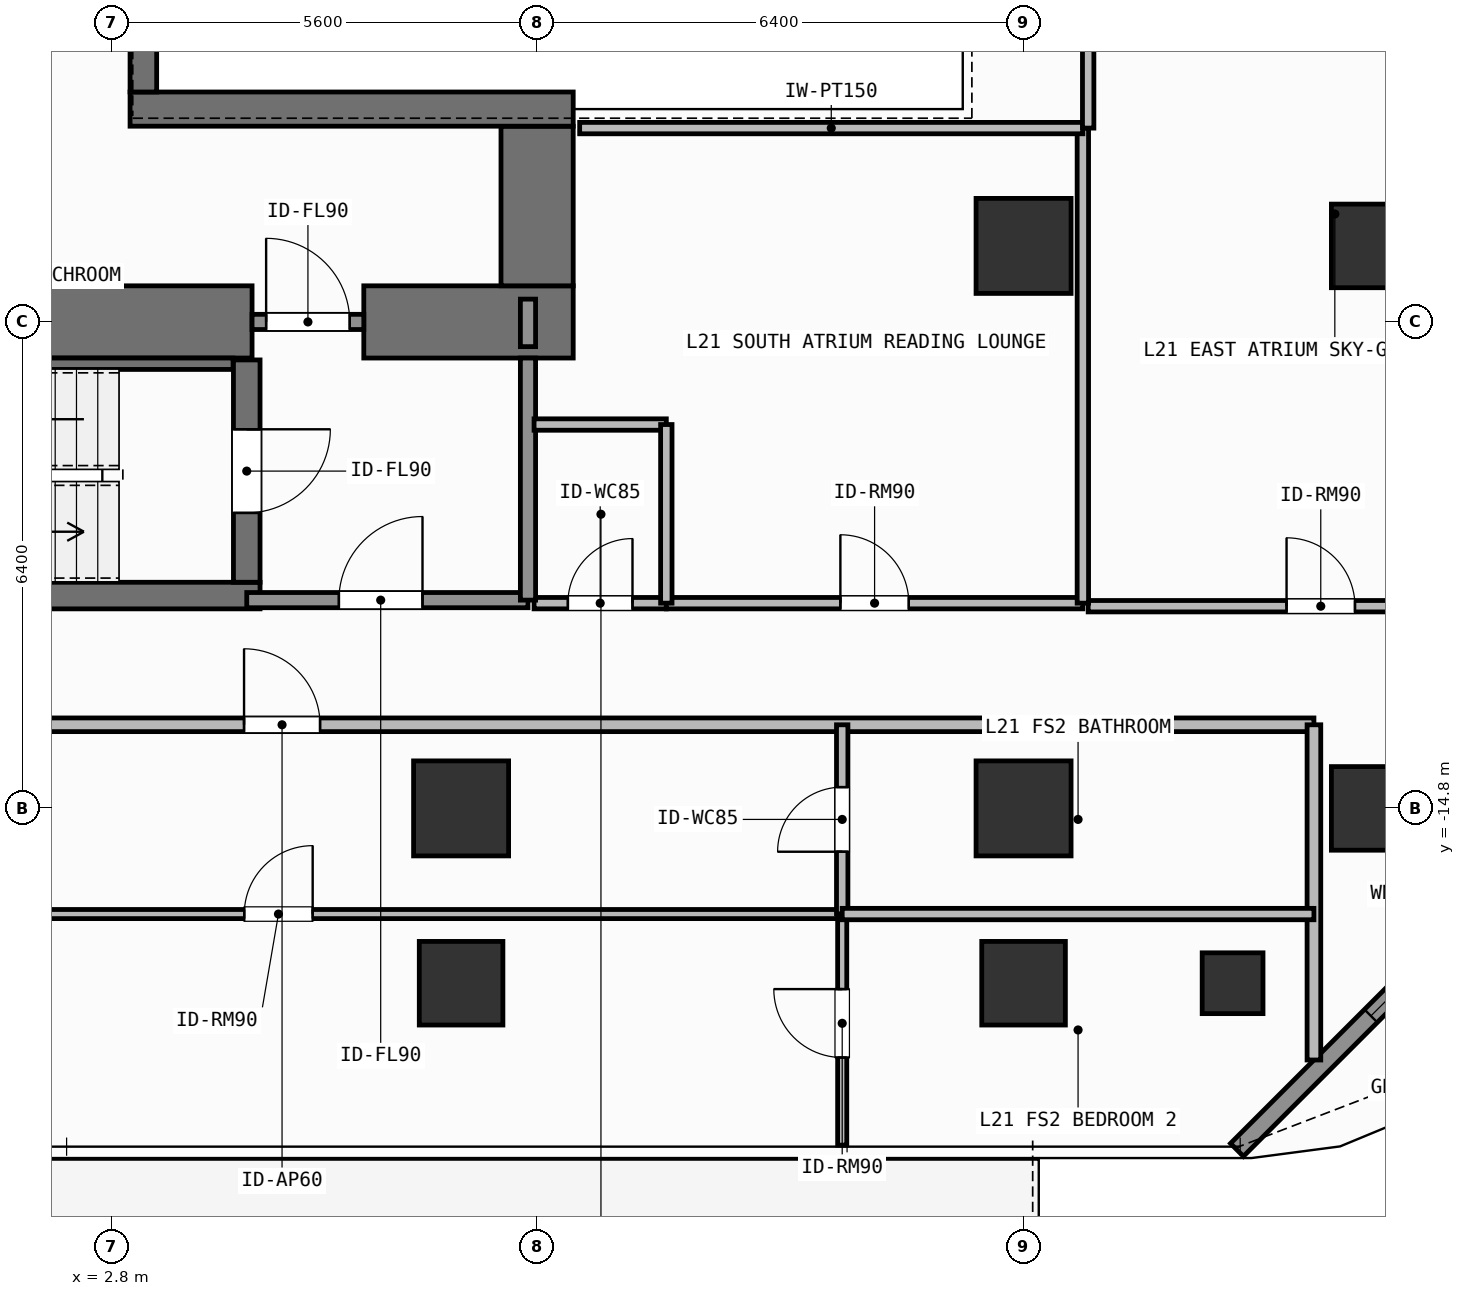
"""IFC4 building model, lengths in metres.
Left out: names, types, materials, properties, quantities, classifications, styles, units other than length and angle.
Written with IfcOpenShell. Run it as: python <this file> out.ifc"""

import sys

from ifc_helpers import new_model, si_unit, direction, frame, frame_2d, origin, origin_2d, place, context, subcontext, project, spatial, rectangle, hollow_rectangle, extrude, element, fill, save


model = new_model("IFC4")
c1 = context("Model", 3, precision=1e-05, world=origin(), true_north=direction((0.0, 1.0)))
c2 = subcontext(c1, "Body", "Model", "MODEL_VIEW")
j1 = project(units=[si_unit("LENGTHUNIT", "METRE"), si_unit("PLANEANGLEUNIT", "RADIAN")], contexts=[c1])
p1 = place(None, origin())
s1 = spatial("IfcSite", under=j1, at=p1, CompositionType="ELEMENT")
p2 = place(p1, origin())
s2 = spatial("IfcBuilding", under=s1, at=p2, CompositionType="ELEMENT")
p3 = place(p2, frame((0.0, 0.0, 85.2)))
s3 = spatial("IfcBuildingStorey", under=s2, at=p3, CompositionType="ELEMENT", Elevation=85.2)
p4 = place(p3, frame((-2.62, -8.4, 0.0), z_axis=(0.0, 0.0, 1.0), x_axis=(1.0, 0.0, 0.0)))
e1 = element("IfcWall", 1, at=p4, inside=s3, PredefinedType="SHEAR", context=c2, shape_type="SweptSolid", body=[
    extrude(rectangle(XDim=7.27, YDim=0.95, at=frame_2d((3.635, 0.0))), origin(), (0.0, 0.0, 1.0), 3.9),
])
p5 = place(p3, frame((6.12, -8.4, 0.0), z_axis=(0.0, 0.0, 1.0), x_axis=(1.0, 0.0, 0.0)))
e2 = element("IfcWall", 2, at=p5, inside=s3, PredefinedType="SHEAR", context=c2, shape_type="SweptSolid", body=[
    extrude(rectangle(XDim=2.755, YDim=0.95, at=frame_2d((1.377, 0.0))), origin(), (0.0, 0.0, 1.0), 3.9),
])
p6 = place(p3, frame((8.4, -7.925, 0.0), z_axis=(0.0, 0.0, 1.0), x_axis=(0.0, 1.0, 0.0)))
e3 = element("IfcWall", 3, at=p6, inside=s3, PredefinedType="SHEAR", context=c2, shape_type="SweptSolid", body=[
    extrude(rectangle(XDim=2.1, YDim=0.95, at=frame_2d((1.05, 0.0))), origin(), (0.0, 0.0, 1.0), 3.9),
])
p7 = place(p3, frame((3.045, -5.6, 0.0), z_axis=(0.0, 0.0, 1.0), x_axis=(1.0, 0.0, 0.0)))
e4 = element("IfcWall", 4, at=p7, inside=s3, PredefinedType="SHEAR", context=c2, shape_type="SweptSolid", body=[
    extrude(rectangle(XDim=5.83, YDim=0.45, at=frame_2d((2.915, 0.0))), origin(), (0.0, 0.0, 1.0), 3.9),
])
p8 = place(p3, frame((3.22, -5.375, 0.0), z_axis=(0.0, 0.0, 1.0), x_axis=(0.0, 1.0, 0.0)))
e5 = element("IfcWall", 5, at=p8, inside=s3, PredefinedType="SHEAR", context=c2, shape_type="SweptSolid", body=[
    extrude(rectangle(XDim=10.75, YDim=0.35, at=frame_2d((5.375, 0.0))), origin(), (0.0, 0.0, 1.0), 3.9),
])
p9 = place(p3, frame((-2.555, -12.0, 0.0), z_axis=(0.0, 0.0, 1.0), x_axis=(1.0, 0.0, 0.0)))
e6 = element("IfcWall", 6, at=p9, inside=s3, PredefinedType="SHEAR", context=c2, shape_type="SweptSolid", body=[
    extrude(rectangle(XDim=7.31, YDim=0.35, at=frame_2d((3.655, 0.0))), origin(), (0.0, 0.0, 1.0), 3.9),
])
p10 = place(p3, frame((-2.2, -8.95, 0.0), z_axis=(0.0, 0.0, 1.0), x_axis=(1.0, 0.0, 0.0)))
e7 = element("IfcWall", 7, at=p10, inside=s3, PredefinedType="SHEAR", context=c2, shape_type="SweptSolid", body=[
    extrude(rectangle(XDim=6.6, YDim=0.15, at=frame_2d((3.3, 0.0))), origin(), (0.0, 0.0, 1.0), 3.9),
])
p11 = place(p3, frame((4.58, -8.9, 0.0), z_axis=(0.0, 0.0, 1.0), x_axis=(0.0, -1.0, 0.0)))
e8 = element("IfcWall", 8, at=p11, inside=s3, PredefinedType="SHEAR", context=c2, shape_type="SweptSolid", body=[
    extrude(rectangle(XDim=2.925, YDim=0.35, at=frame_2d((1.462, 0.0))), origin(), (0.0, 0.0, 1.0), 3.9),
])
p12 = place(p11, frame((0.913, 0.0, 0.0)))
e9 = element("IfcOpeningElement", 9, at=p12, cuts=e8, PredefinedType="OPENING", context=c2, shape_type="SweptSolid", body=[
    extrude(rectangle(XDim=1.1, YDim=2.15, at=frame_2d((0.55, 1.075))), frame((0.0, 0.185, 0.0), z_axis=(0.0, -1.0, 0.0), x_axis=(1.0, 0.0, 0.0)), (0.0, 0.0, 1.0), 0.37),
])
for number, where, z_axis, x_axis in (
    (10, (7.4, -14.8, 0.0), (0.0, 0.0, 1.0), (1.0, 0.0, 0.0)),
    (11, (14.8, -14.8, 0.0), (0.0, 0.0, 1.0), (1.0, 0.0, 0.0)),
    (12, (14.8, -7.4, 0.0), (0.0, 0.0, 1.0), (1.0, 0.0, 0.0)),
):
    element("IfcColumn", number, at=place(p3, frame(where, z_axis=z_axis, x_axis=x_axis)), inside=s3, PredefinedType="COLUMN", context=c2, shape_type="SweptSolid", body=[
        extrude(rectangle(XDim=1.25, YDim=1.25, at=origin_2d()), origin(), (0.0, 0.0, 1.0), 3.9),
    ])
for number, where, z_axis, x_axis in (
    (13, (19.4, -14.8, 0.0), (0.0, 0.0, 1.0), (1.0, 0.0, 0.0)),
    (14, (19.4, -7.4, 0.0), (0.0, 0.0, 1.0), (1.0, 0.0, 0.0)),
    (15, (7.4, -17.1, 0.0), (0.0, 0.0, 1.0), (1.0, 0.0, 0.0)),
    (16, (14.8, -17.1, 0.0), (0.0, 0.0, 1.0), (1.0, 0.0, 0.0)),
):
    element("IfcColumn", number, at=place(p3, frame(where, z_axis=z_axis, x_axis=x_axis)), inside=s3, PredefinedType="COLUMN", context=c2, shape_type="SweptSolid", body=[
        extrude(rectangle(XDim=1.1, YDim=1.1, at=origin_2d()), origin(), (0.0, 0.0, 1.0), 3.9),
    ])
p13 = place(p3, frame((17.55, -17.1, 0.0), z_axis=(0.0, 0.0, 1.0), x_axis=(1.0, 0.0, 0.0)))
e17 = element("IfcColumn", 17, at=p13, inside=s3, PredefinedType="COLUMN", context=c2, shape_type="SweptSolid", body=[
    extrude(hollow_rectangle(XDim=0.8, YDim=0.8, WallThickness=0.036, at=origin_2d()), origin(), (0.0, 0.0, 1.0), 3.9),
])
p14 = place(p3, frame((22.192, -14.708, 0.0), z_axis=(0.0, 0.0, 1.0), x_axis=(-0.707087954376, -0.707125607496, 0.0)))
e18 = element("IfcWall", 18, at=p14, inside=s3, PredefinedType="SOLIDWALL", context=c2, shape_type="SweptSolid", body=[
    extrude(rectangle(XDim=6.484, YDim=0.24, at=frame_2d((3.242, 0.0))), origin(), (0.0, 0.0, 1.0), 3.68),
])
p15 = place(p14, frame((2.492, 0.0, 0.8)))
e19 = element("IfcOpeningElement", 19, at=p15, cuts=e18, PredefinedType="OPENING", context=c2, shape_type="SweptSolid", body=[
    extrude(rectangle(XDim=1.5, YDim=1.85, at=frame_2d((0.75, 0.925))), frame((0.0, 0.13, 0.0), z_axis=(0.0, -1.0, 0.0), x_axis=(1.0, 0.0, 0.0)), (0.0, 0.0, 1.0), 0.26),
])
p16 = place(p3, frame((4.58, -12.06, 0.0), z_axis=(0.0, 0.0, 1.0), x_axis=(1.0, 0.0, 0.0)))
e20 = element("IfcWall", 20, at=p16, inside=s3, PredefinedType="SOLIDWALL", context=c2, shape_type="SweptSolid", body=[
    extrude(rectangle(XDim=3.7, YDim=0.2, at=frame_2d((1.85, 0.0))), origin(), (0.0, 0.0, 1.0), 3.68),
])
p17 = place(p16, frame((1.212, 0.0, 0.0)))
e21 = element("IfcOpeningElement", 21, at=p17, cuts=e20, PredefinedType="OPENING", context=c2, shape_type="SweptSolid", body=[
    extrude(rectangle(XDim=1.1, YDim=2.15, at=frame_2d((0.55, 1.075))), frame((0.0, 0.11, 0.0), z_axis=(0.0, -1.0, 0.0), x_axis=(1.0, 0.0, 0.0)), (0.0, 0.0, 1.0), 0.22),
])
p18 = place(p3, frame((4.65, -8.4, 0.0), z_axis=(0.0, 0.0, 1.0), x_axis=(1.0, 0.0, 0.0)))
e22 = element("IfcWall", 22, at=p18, inside=s3, PredefinedType="SOLIDWALL", context=c2, shape_type="SweptSolid", body=[
    extrude(rectangle(XDim=1.47, YDim=0.2, at=frame_2d((0.735, 0.0))), origin(), (0.0, 0.0, 1.0), 2.72),
])
p19 = place(p18, frame((0.185, 0.0, 0.0)))
e23 = element("IfcOpeningElement", 23, at=p19, cuts=e22, PredefinedType="OPENING", context=c2, shape_type="SweptSolid", body=[
    extrude(rectangle(XDim=1.1, YDim=2.15, at=frame_2d((0.55, 1.075))), frame((0.0, 0.11, 0.0), z_axis=(0.0, -1.0, 0.0), x_axis=(1.0, 0.0, 0.0)), (0.0, 0.0, 1.0), 0.22),
])
p20 = place(p3, frame((8.36, -12.1, 0.0), z_axis=(0.0, 0.0, 1.0), x_axis=(1.0, 0.0, 0.0)))
e24 = element("IfcWall", 24, at=p20, inside=s3, PredefinedType="PARTITIONING", context=c2, shape_type="SweptSolid", body=[
    extrude(rectangle(XDim=1.74, YDim=0.15, at=frame_2d((0.87, 0.0))), origin(), (0.0, 0.0, 1.0), 3.68),
])
p21 = place(p20, frame((0.445, 0.0, 0.0)))
e25 = element("IfcOpeningElement", 25, at=p21, cuts=e24, PredefinedType="OPENING", context=c2, shape_type="SweptSolid", body=[
    extrude(rectangle(XDim=0.85, YDim=2.1, at=frame_2d((0.425, 1.05))), frame((0.0, 0.085, 0.0), z_axis=(0.0, -1.0, 0.0), x_axis=(1.0, 0.0, 0.0)), (0.0, 0.0, 1.0), 0.17),
])
p22 = place(p3, frame((10.1, -12.1, 0.0), z_axis=(0.0, 0.0, 1.0), x_axis=(1.0, 0.0, 0.0)))
e26 = element("IfcWall", 26, at=p22, inside=s3, PredefinedType="PARTITIONING", context=c2, shape_type="SweptSolid", body=[
    extrude(rectangle(XDim=5.48, YDim=0.15, at=frame_2d((2.74, 0.0))), origin(), (0.0, 0.0, 1.0), 3.68),
])
p23 = place(p22, frame((2.29, 0.0, 0.0)))
e27 = element("IfcOpeningElement", 27, at=p23, cuts=e26, PredefinedType="OPENING", context=c2, shape_type="SweptSolid", body=[
    extrude(rectangle(XDim=0.9, YDim=2.1, at=frame_2d((0.45, 1.05))), frame((0.0, 0.085, 0.0), z_axis=(0.0, -1.0, 0.0), x_axis=(1.0, 0.0, 0.0)), (0.0, 0.0, 1.0), 0.17),
])
p24 = place(p3, frame((-7.634, -13.7, 0.0), z_axis=(0.0, 0.0, 1.0), x_axis=(1.0, 0.0, 0.0)))
e28 = element("IfcWall", 28, at=p24, inside=s3, PredefinedType="PARTITIONING", context=c2, shape_type="SweptSolid", body=[
    extrude(rectangle(XDim=26.254, YDim=0.18, at=frame_2d((13.127, 0.0))), origin(), (0.0, 0.0, 1.0), 3.68),
])
p25 = place(p24, frame((12.178, 0.0, 0.0)))
e29 = element("IfcOpeningElement", 29, at=p25, cuts=e28, PredefinedType="OPENING", context=c2, shape_type="SweptSolid", body=[
    extrude(rectangle(XDim=1.0, YDim=2.2, at=frame_2d((0.5, 1.1))), frame((0.0, 0.1, 0.0), z_axis=(0.0, -1.0, 0.0), x_axis=(1.0, 0.0, 0.0)), (0.0, 0.0, 1.0), 0.2),
])
p26 = place(p3, frame((-2.24, -16.19, 0.0), z_axis=(0.0, 0.0, 1.0), x_axis=(1.0, 0.0, 0.0)))
e30 = element("IfcWall", 30, at=p26, inside=s3, PredefinedType="PARTITIONING", context=c2, shape_type="SweptSolid", body=[
    extrude(rectangle(XDim=14.654, YDim=0.12, at=frame_2d((7.327, 0.0))), origin(), (0.0, 0.0, 1.0), 3.68),
])
p27 = place(p26, frame((6.787, 0.0, 0.0)))
e31 = element("IfcOpeningElement", 31, at=p27, cuts=e30, PredefinedType="OPENING", context=c2, shape_type="SweptSolid", body=[
    extrude(rectangle(XDim=0.9, YDim=2.1, at=frame_2d((0.45, 1.05))), frame((0.0, 0.07, 0.0), z_axis=(0.0, -1.0, 0.0), x_axis=(1.0, 0.0, 0.0)), (0.0, 0.0, 1.0), 0.14),
])
p28 = place(p3, frame((12.414, -16.19, 0.0), z_axis=(0.0, 0.0, 1.0), x_axis=(0.0, 1.0, 0.0)))
e32 = element("IfcWall", 32, at=p28, inside=s3, PredefinedType="PARTITIONING", context=c2, shape_type="SweptSolid", body=[
    extrude(rectangle(XDim=2.49, YDim=0.15, at=frame_2d((1.245, 0.0))), origin(), (0.0, 0.0, 1.0), 3.68),
])
p29 = place(p28, frame((0.82, 0.0, 0.0)))
e33 = element("IfcOpeningElement", 33, at=p29, cuts=e32, PredefinedType="OPENING", context=c2, shape_type="SweptSolid", body=[
    extrude(rectangle(XDim=0.85, YDim=2.1, at=frame_2d((0.425, 1.05))), frame((0.0, 0.085, 0.0), z_axis=(0.0, -1.0, 0.0), x_axis=(1.0, 0.0, 0.0)), (0.0, 0.0, 1.0), 0.17),
])
p30 = place(p3, frame((12.414, -19.23, 0.0), z_axis=(0.0, 0.0, 1.0), x_axis=(0.0, 1.0, 0.0)))
e34 = element("IfcWall", 34, at=p30, inside=s3, PredefinedType="PARTITIONING", context=c2, shape_type="SweptSolid", body=[
    extrude(rectangle(XDim=3.04, YDim=0.12, at=frame_2d((1.52, 0.0))), origin(), (0.0, 0.0, 1.0), 3.68),
])
p31 = place(p30, frame((1.153, 0.0, 0.0)))
e35 = element("IfcOpeningElement", 35, at=p31, cuts=e34, PredefinedType="OPENING", context=c2, shape_type="SweptSolid", body=[
    extrude(rectangle(XDim=0.9, YDim=2.1, at=frame_2d((0.45, 1.05))), frame((0.0, 0.07, 0.0), z_axis=(0.0, -1.0, 0.0), x_axis=(1.0, 0.0, 0.0)), (0.0, 0.0, 1.0), 0.14),
])
p32 = place(p3, frame((15.65, -12.14, 0.0), z_axis=(0.0, 0.0, 1.0), x_axis=(1.0, 0.0, 0.0)))
e36 = element("IfcWall", 36, at=p32, inside=s3, PredefinedType="PARTITIONING", context=c2, shape_type="SweptSolid", body=[
    extrude(rectangle(XDim=6.47, YDim=0.15, at=frame_2d((3.235, 0.0))), origin(), (0.0, 0.0, 1.0), 3.68),
])
p33 = place(p32, frame((2.61, 0.0, 0.0)))
e37 = element("IfcOpeningElement", 37, at=p33, cuts=e36, PredefinedType="OPENING", context=c2, shape_type="SweptSolid", body=[
    extrude(rectangle(XDim=0.9, YDim=2.1, at=frame_2d((0.45, 1.05))), frame((0.0, 0.085, 0.0), z_axis=(0.0, -1.0, 0.0), x_axis=(1.0, 0.0, 0.0)), (0.0, 0.0, 1.0), 0.17),
])
p34 = place(p3, frame((8.28, -12.06, 0.0), z_axis=(0.0, 0.0, 1.0), x_axis=(0.0, 1.0, 0.0)))
e38 = element("IfcWall", 38, at=p34, inside=s3, PredefinedType="SOLIDWALL", context=c2, shape_type="SweptSolid", body=[
    extrude(rectangle(XDim=3.185, YDim=0.2, at=frame_2d((1.593, 0.0))), origin(), (0.0, 0.0, 1.0), 3.68),
])
p35 = place(p3, frame((8.28, -8.725, 0.0), z_axis=(0.0, 0.0, 1.0), x_axis=(0.0, 1.0, 0.0)))
e39 = element("IfcWall", 39, at=p35, inside=s3, PredefinedType="SOLIDWALL", context=c2, shape_type="SweptSolid", body=[
    extrude(rectangle(XDim=0.625, YDim=0.2, at=frame_2d((0.312, 0.0))), origin(), (0.0, 0.0, 1.0), 3.68),
])
p36 = place(p3, frame((8.36, -9.75, 0.0), z_axis=(0.0, 0.0, 1.0), x_axis=(1.0, 0.0, 0.0)))
e40 = element("IfcWall", 40, at=p36, inside=s3, PredefinedType="PARTITIONING", context=c2, shape_type="SweptSolid", body=[
    extrude(rectangle(XDim=1.74, YDim=0.15, at=frame_2d((0.87, 0.0))), origin(), (0.0, 0.0, 1.0), 3.68),
])
p37 = place(p3, frame((10.1, -12.1, 0.0), z_axis=(0.0, 0.0, 1.0), x_axis=(0.0, 1.0, 0.0)))
e41 = element("IfcWall", 41, at=p37, inside=s3, PredefinedType="PARTITIONING", context=c2, shape_type="SweptSolid", body=[
    extrude(rectangle(XDim=2.35, YDim=0.15, at=frame_2d((1.175, 0.0))), origin(), (0.0, 0.0, 1.0), 3.68),
])
p38 = place(p3, frame((15.58, -12.1, 0.0), z_axis=(0.0, 0.0, 1.0), x_axis=(0.0, 1.0, 0.0)))
e42 = element("IfcWall", 42, at=p38, inside=s3, PredefinedType="PARTITIONING", context=c2, shape_type="SweptSolid", body=[
    extrude(rectangle(XDim=6.25, YDim=0.15, at=frame_2d((3.125, 0.0))), origin(), (0.0, 0.0, 1.0), 3.68),
])
p39 = place(p3, frame((8.96, -5.85, 0.0), z_axis=(0.0, 0.0, 1.0), x_axis=(1.0, 0.0, 0.0)))
e43 = element("IfcWall", 43, at=p39, inside=s3, PredefinedType="PARTITIONING", context=c2, shape_type="SweptSolid", body=[
    extrude(rectangle(XDim=6.62, YDim=0.15, at=frame_2d((3.31, 0.0))), origin(), (0.0, 0.0, 1.0), 3.68),
])
p40 = place(p3, frame((18.62, -18.11, 0.0), z_axis=(0.0, 0.0, 1.0), x_axis=(0.0, 1.0, 0.0)))
e44 = element("IfcWall", 44, at=p40, inside=s3, PredefinedType="PARTITIONING", context=c2, shape_type="SweptSolid", body=[
    extrude(rectangle(XDim=4.41, YDim=0.18, at=frame_2d((2.205, 0.0))), origin(), (0.0, 0.0, 1.0), 3.68),
])
p41 = place(p3, frame((12.414, -16.19, 0.0), z_axis=(0.0, 0.0, 1.0), x_axis=(1.0, 0.0, 0.0)))
e45 = element("IfcWall", 45, at=p41, inside=s3, PredefinedType="PARTITIONING", context=c2, shape_type="SweptSolid", body=[
    extrude(rectangle(XDim=6.206, YDim=0.15, at=frame_2d((3.103, 0.0))), origin(), (0.0, 0.0, 1.0), 3.68),
])
p42 = place(p3, frame((15.65, -5.85, 0.0), z_axis=(0.0, 0.0, 1.0), x_axis=(0.0, 1.0, 0.0)))
e46 = element("IfcWall", 46, at=p42, inside=s3, PredefinedType="PARTITIONING", context=c2, shape_type="SweptSolid", body=[
    extrude(rectangle(XDim=4.05, YDim=0.15, at=frame_2d((2.025, 0.0))), origin(), (0.0, 0.0, 1.0), 3.68),
])
p43 = place(p15, origin())
e47 = element("IfcWindow", 47, at=p43, inside=s3, PartitioningType="SINGLE_PANEL", PredefinedType="WINDOW", context=c2, shape_type="SweptSolid", body=[
    extrude(rectangle(XDim=1.5, YDim=1.85, at=frame_2d((0.75, 0.925))), frame((0.0, 0.03, 0.0), z_axis=(0.0, -1.0, 0.0), x_axis=(1.0, 0.0, 0.0)), (0.0, 0.0, 1.0), 0.06),
])
fill(e19, e47)
p44 = place(p12, origin())
e48 = element("IfcDoor", 48, at=p44, inside=s3, OperationType="SINGLE_SWING_LEFT", PredefinedType="DOOR", context=c2, shape_type="SweptSolid", body=[
    extrude(rectangle(XDim=1.1, YDim=2.15, at=frame_2d((0.55, 1.075))), frame((0.0, 0.025, 0.0), z_axis=(0.0, -1.0, 0.0), x_axis=(1.0, 0.0, 0.0)), (0.0, 0.0, 1.0), 0.05),
])
fill(e9, e48)
p45 = place(p17, origin())
e49 = element("IfcDoor", 49, at=p45, inside=s3, OperationType="SINGLE_SWING_RIGHT", PredefinedType="DOOR", context=c2, shape_type="SweptSolid", body=[
    extrude(rectangle(XDim=1.1, YDim=2.15, at=frame_2d((0.55, 1.075))), frame((0.0, 0.025, 0.0), z_axis=(0.0, -1.0, 0.0), x_axis=(1.0, 0.0, 0.0)), (0.0, 0.0, 1.0), 0.05),
])
fill(e21, e49)
p46 = place(p19, origin())
e50 = element("IfcDoor", 50, at=p46, inside=s3, OperationType="SINGLE_SWING_LEFT", PredefinedType="DOOR", context=c2, shape_type="SweptSolid", body=[
    extrude(rectangle(XDim=1.1, YDim=2.15, at=frame_2d((0.55, 1.075))), frame((0.0, 0.025, 0.0), z_axis=(0.0, -1.0, 0.0), x_axis=(1.0, 0.0, 0.0)), (0.0, 0.0, 1.0), 0.05),
])
fill(e23, e50)
p47 = place(p21, origin())
e51 = element("IfcDoor", 51, at=p47, inside=s3, OperationType="SINGLE_SWING_RIGHT", PredefinedType="DOOR", context=c2, shape_type="SweptSolid", body=[
    extrude(rectangle(XDim=0.85, YDim=2.1, at=frame_2d((0.425, 1.05))), frame((0.0, 0.025, 0.0), z_axis=(0.0, -1.0, 0.0), x_axis=(1.0, 0.0, 0.0)), (0.0, 0.0, 1.0), 0.05),
])
fill(e25, e51)
p48 = place(p23, origin())
e52 = element("IfcDoor", 52, at=p48, inside=s3, OperationType="SINGLE_SWING_LEFT", PredefinedType="DOOR", context=c2, shape_type="SweptSolid", body=[
    extrude(rectangle(XDim=0.9, YDim=2.1, at=frame_2d((0.45, 1.05))), frame((0.0, 0.025, 0.0), z_axis=(0.0, -1.0, 0.0), x_axis=(1.0, 0.0, 0.0)), (0.0, 0.0, 1.0), 0.05),
])
fill(e27, e52)
p49 = place(p25, origin())
e53 = element("IfcDoor", 53, at=p49, inside=s3, OperationType="SINGLE_SWING_LEFT", PredefinedType="DOOR", context=c2, shape_type="SweptSolid", body=[
    extrude(rectangle(XDim=1.0, YDim=2.2, at=frame_2d((0.5, 1.1))), frame((0.0, 0.025, 0.0), z_axis=(0.0, -1.0, 0.0), x_axis=(1.0, 0.0, 0.0)), (0.0, 0.0, 1.0), 0.05),
])
fill(e29, e53)
p50 = place(p27, origin())
e54 = element("IfcDoor", 54, at=p50, inside=s3, OperationType="SINGLE_SWING_RIGHT", PredefinedType="DOOR", context=c2, shape_type="SweptSolid", body=[
    extrude(rectangle(XDim=0.9, YDim=2.1, at=frame_2d((0.45, 1.05))), frame((0.0, 0.025, 0.0), z_axis=(0.0, -1.0, 0.0), x_axis=(1.0, 0.0, 0.0)), (0.0, 0.0, 1.0), 0.05),
])
fill(e31, e54)
p51 = place(p29, origin())
e55 = element("IfcDoor", 55, at=p51, inside=s3, OperationType="SINGLE_SWING_LEFT", PredefinedType="DOOR", context=c2, shape_type="SweptSolid", body=[
    extrude(rectangle(XDim=0.85, YDim=2.1, at=frame_2d((0.425, 1.05))), frame((0.0, 0.025, 0.0), z_axis=(0.0, -1.0, 0.0), x_axis=(1.0, 0.0, 0.0)), (0.0, 0.0, 1.0), 0.05),
])
fill(e33, e55)
p52 = place(p31, origin())
e56 = element("IfcDoor", 56, at=p52, inside=s3, OperationType="SINGLE_SWING_RIGHT", PredefinedType="DOOR", context=c2, shape_type="SweptSolid", body=[
    extrude(rectangle(XDim=0.9, YDim=2.1, at=frame_2d((0.45, 1.05))), frame((0.0, 0.025, 0.0), z_axis=(0.0, -1.0, 0.0), x_axis=(1.0, 0.0, 0.0)), (0.0, 0.0, 1.0), 0.05),
])
fill(e35, e56)
p53 = place(p33, origin())
e57 = element("IfcDoor", 57, at=p53, inside=s3, OperationType="SINGLE_SWING_LEFT", PredefinedType="DOOR", context=c2, shape_type="SweptSolid", body=[
    extrude(rectangle(XDim=0.9, YDim=2.1, at=frame_2d((0.45, 1.05))), frame((0.0, 0.025, 0.0), z_axis=(0.0, -1.0, 0.0), x_axis=(1.0, 0.0, 0.0)), (0.0, 0.0, 1.0), 0.05),
])
fill(e37, e57)
save(model, sys.argv[1])
